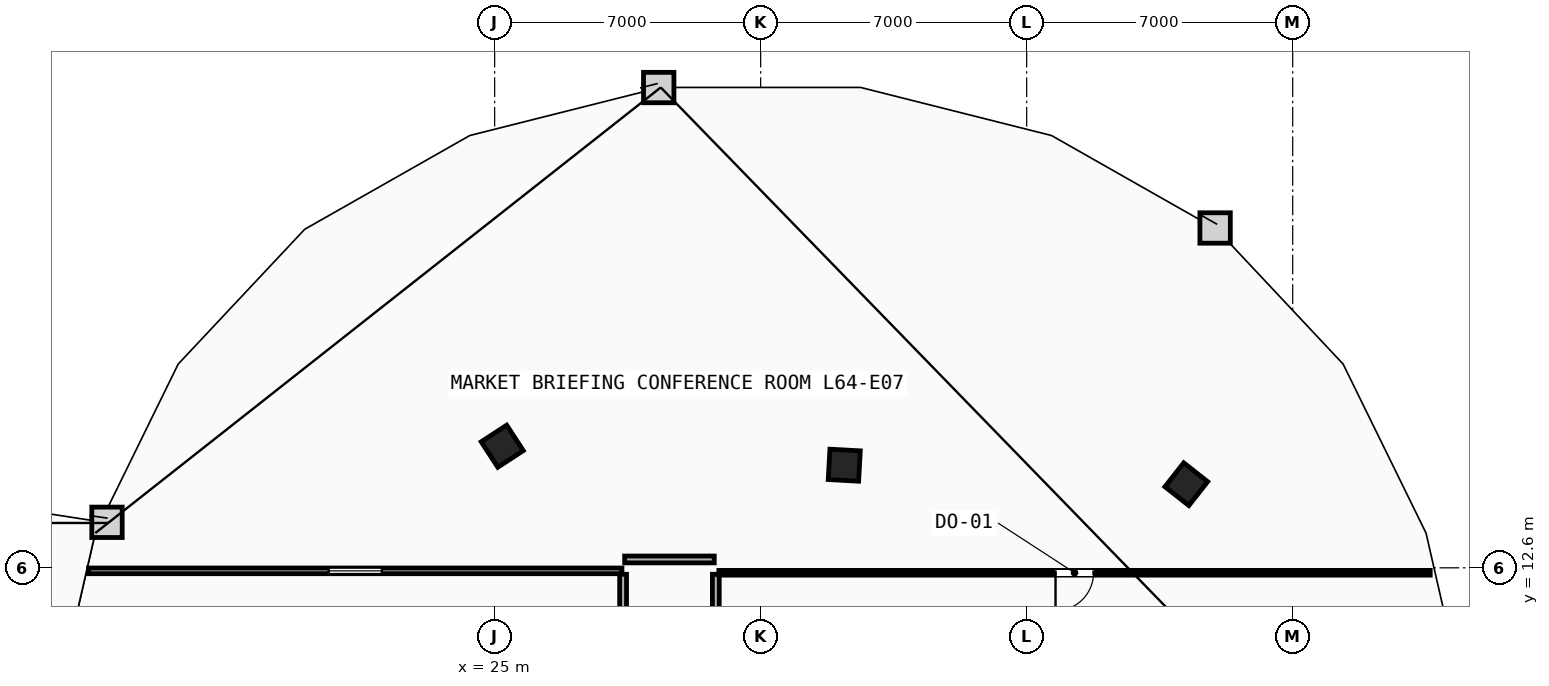
"""IFC4 building model, lengths in metres.
Left out: names, types, materials, properties, quantities, classifications, styles, units other than length and angle.
Written with IfcOpenShell. Run it as: python <this file> out.ifc"""

import sys

from ifc_helpers import new_model, si_unit, direction, frame, frame_2d, origin, origin_2d, place, context, subcontext, project, spatial, rectangle, extrude, element, fill, save


model = new_model("IFC4")
c1 = context("Model", 3, precision=1e-05, world=origin(), true_north=direction((0.0, 1.0)))
c2 = subcontext(c1, "Body", "Model", "MODEL_VIEW")
j1 = project(units=[si_unit("LENGTHUNIT", "METRE"), si_unit("PLANEANGLEUNIT", "RADIAN")], contexts=[c1])
p1 = place(None, origin())
s1 = spatial("IfcSite", under=j1, at=p1, CompositionType="ELEMENT")
p2 = place(p1, origin())
s2 = spatial("IfcBuilding", under=s1, at=p2, CompositionType="ELEMENT")
p3 = place(p2, frame((0.0, 0.0, 243.2)))
s3 = spatial("IfcBuildingStorey", under=s2, at=p3, CompositionType="ELEMENT", Elevation=243.2)
for number, where, z_axis, x_axis in (
    (1, (43.2, 14.8, 0.0), (0.0, 0.0, 1.0), (-0.786, 0.618, 0.0)),
    (2, (34.2, 15.3, 0.0), (0.0, 0.0, 1.0), (-0.998, 0.055, 0.0)),
    (3, (25.2, 15.8, 0.0), (0.0, 0.0, 1.0), (-0.838, -0.546, 0.0)),
):
    element("IfcColumn", number, at=place(p3, frame(where, z_axis=z_axis, x_axis=x_axis)), inside=s3, PredefinedType="COLUMN", context=c2, shape_type="SweptSolid", body=[
        extrude(rectangle(XDim=0.8, YDim=0.8, at=origin_2d()), origin(), (0.0, 0.0, 1.0), 3.6),
    ])
p4 = place(p3, frame((14.314, 12.52, 0.0), z_axis=(0.0, 0.0, 1.0), x_axis=(1.0, 0.0, 0.0)))
e4 = element("IfcWall", 4, at=p4, inside=s3, PredefinedType="PARTITIONING", context=c2, shape_type="SweptSolid", body=[
    extrude(rectangle(XDim=14.036, YDim=0.15, at=frame_2d((7.018, 0.0))), origin(), (0.0, 0.0, 1.0), 3.34),
])
p5 = place(p4, frame((6.318, 0.0, 1.05)))
e5 = element("IfcOpeningElement", 5, at=p5, cuts=e4, PredefinedType="OPENING", context=c2, shape_type="SweptSolid", body=[
    extrude(rectangle(XDim=1.4, YDim=1.5, at=frame_2d((0.7, 0.75))), frame((0.0, 0.085, 0.0), z_axis=(0.0, -1.0, 0.0), x_axis=(1.0, 0.0, 0.0)), (0.0, 0.0, 1.0), 0.17),
])
p6 = place(p3, frame((28.38, 12.43, 0.0), z_axis=(0.0, 0.0, 1.0), x_axis=(0.0, -1.0, 0.0)))
e6 = element("IfcWall", 6, at=p6, inside=s3, PredefinedType="PARTITIONING", context=c2, shape_type="SweptSolid", body=[
    extrude(rectangle(XDim=6.36, YDim=0.18, at=frame_2d((3.18, 0.0))), origin(), (0.0, 0.0, 1.0), 3.34),
])
p7 = place(p6, frame((2.68, 0.0, 0.0)))
e7 = element("IfcOpeningElement", 7, at=p7, cuts=e6, PredefinedType="OPENING", context=c2, shape_type="SweptSolid", body=[
    extrude(rectangle(XDim=1.0, YDim=2.15, at=frame_2d((0.5, 1.075))), frame((0.0, 0.1, 0.0), z_axis=(0.0, -1.0, 0.0), x_axis=(1.0, 0.0, 0.0)), (0.0, 0.0, 1.0), 0.2),
])
p8 = place(p3, frame((30.82, 6.07, 0.0), z_axis=(0.0, 0.0, 1.0), x_axis=(0.0, 1.0, 0.0)))
e8 = element("IfcWall", 8, at=p8, inside=s3, PredefinedType="PARTITIONING", context=c2, shape_type="SweptSolid", body=[
    extrude(rectangle(XDim=6.36, YDim=0.18, at=frame_2d((3.18, 0.0))), origin(), (0.0, 0.0, 1.0), 3.34),
])
p9 = place(p8, frame((2.68, 0.0, 0.0)))
e9 = element("IfcOpeningElement", 9, at=p9, cuts=e8, PredefinedType="OPENING", context=c2, shape_type="SweptSolid", body=[
    extrude(rectangle(XDim=1.0, YDim=2.15, at=frame_2d((0.5, 1.075))), frame((0.0, 0.1, 0.0), z_axis=(0.0, -1.0, 0.0), x_axis=(1.0, 0.0, 0.0)), (0.0, 0.0, 1.0), 0.2),
])
p10 = place(p3, frame((30.779, 12.82, 0.0), z_axis=(0.0, 0.0, 1.0), x_axis=(-1.0, 0.0, 0.0)))
e10 = element("IfcWall", 10, at=p10, inside=s3, PredefinedType="PARTITIONING", context=c2, shape_type="SweptSolid", body=[
    extrude(rectangle(XDim=2.357, YDim=0.18, at=frame_2d((1.179, 0.0))), origin(), (0.0, 0.0, 1.0), 3.34),
])
p11 = place(p3, frame((49.619, 12.47, 0.0), z_axis=(0.0, 0.0, 1.0), x_axis=(-1.0, 0.0, 0.0)))
e11 = element("IfcWall", 11, at=p11, inside=s3, PredefinedType="PARTITIONING", context=c2, shape_type="SweptSolid", body=[
    extrude(rectangle(XDim=18.719, YDim=0.125, at=frame_2d((9.359, 0.0))), origin(), (0.0, 0.0, 1.0), 3.34),
])
p12 = place(p11, frame((8.859, 0.0, 0.0)))
e12 = element("IfcOpeningElement", 12, at=p12, cuts=e11, PredefinedType="OPENING", context=c2, shape_type="SweptSolid", body=[
    extrude(rectangle(XDim=1.0, YDim=2.15, at=frame_2d((0.5, 1.075))), frame((0.0, 0.073, 0.0), z_axis=(0.0, -1.0, 0.0), x_axis=(1.0, 0.0, 0.0)), (0.0, 0.0, 1.0), 0.145),
])
p13 = place(p12, origin())
e13 = element("IfcDoor", 13, at=p13, inside=s3, OperationType="SINGLE_SWING_RIGHT", PredefinedType="DOOR", context=c2, shape_type="SweptSolid", body=[
    extrude(rectangle(XDim=1.0, YDim=2.15, at=frame_2d((0.5, 1.075))), frame((0.0, 0.025, 0.0), z_axis=(0.0, -1.0, 0.0), x_axis=(1.0, 0.0, 0.0)), (0.0, 0.0, 1.0), 0.05),
])
fill(e12, e13)
p14 = place(p5, origin())
e14 = element("IfcWindow", 14, at=p14, inside=s3, PartitioningType="SINGLE_PANEL", PredefinedType="WINDOW", context=c2, shape_type="SweptSolid", body=[
    extrude(rectangle(XDim=1.4, YDim=1.5, at=frame_2d((0.7, 0.75))), frame((0.0, 0.03, 0.0), z_axis=(0.0, -1.0, 0.0), x_axis=(1.0, 0.0, 0.0)), (0.0, 0.0, 1.0), 0.06),
])
fill(e5, e14)
save(model, sys.argv[1])
